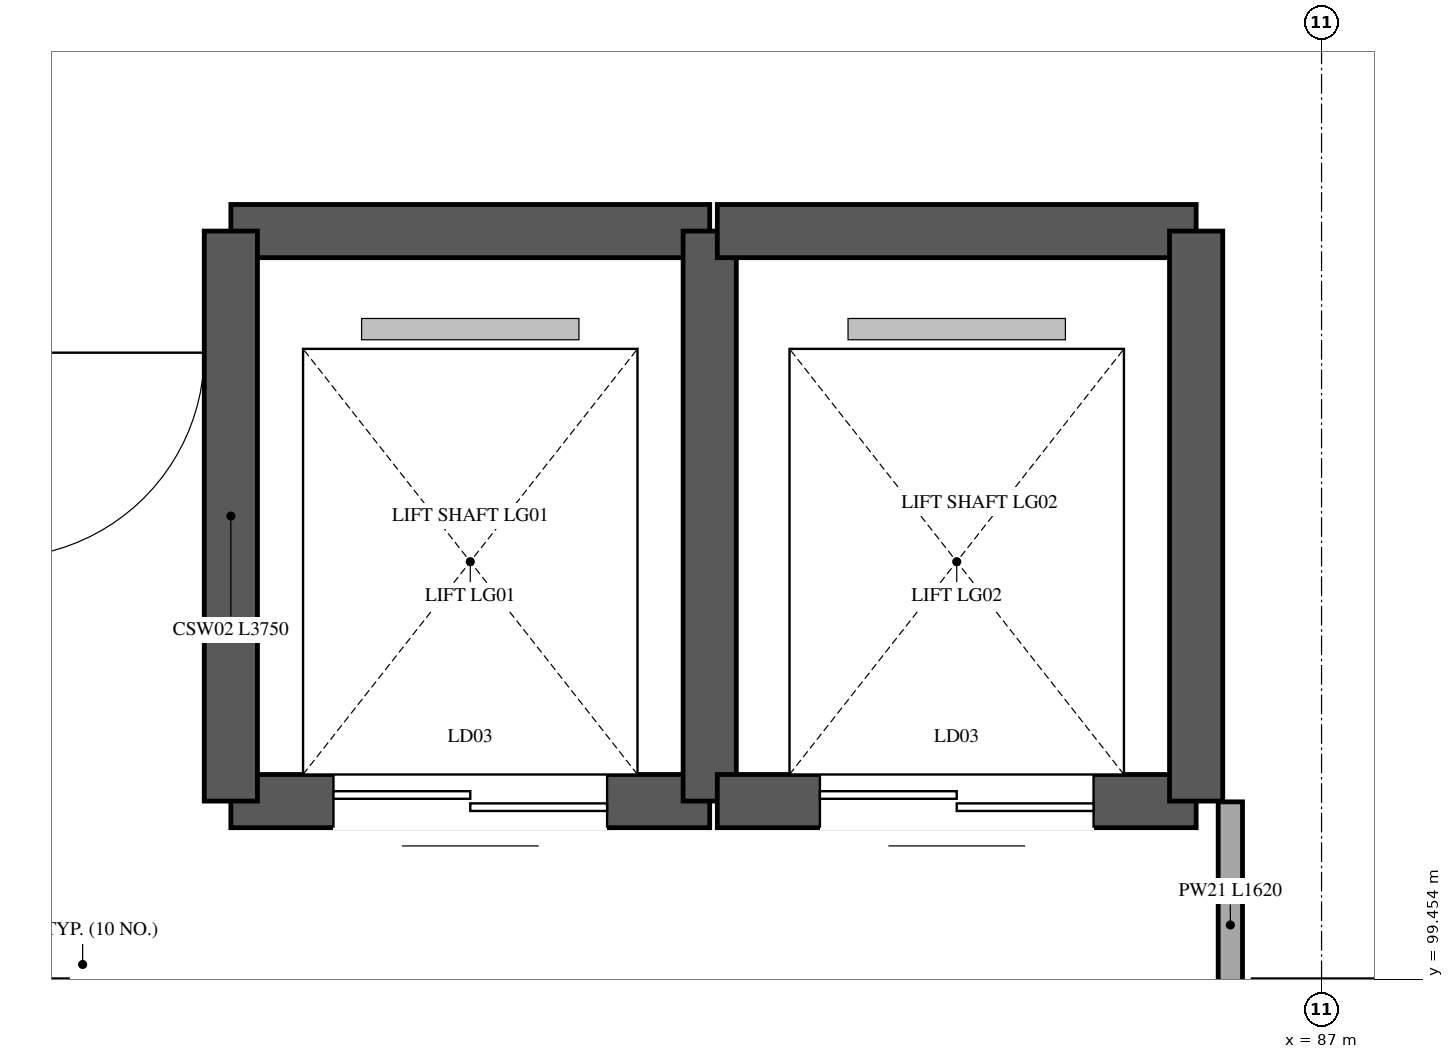
"""IFC4 building model, lengths in metres.
Left out: names, types, materials, properties, quantities, classifications, styles, units other than length and angle.
Written with IfcOpenShell. Run it as: python <this file> out.ifc"""

import sys

from ifc_helpers import new_model, si_unit, direction, frame, frame_2d, origin, place, context, subcontext, project, spatial, rectangle, extrude, element, fill, save


model = new_model("IFC4")
c1 = context("Model", 3, precision=1e-05, world=origin(), true_north=direction((0.0, 1.0)))
c2 = subcontext(c1, "Body", "Model", "MODEL_VIEW")
j1 = project(units=[si_unit("LENGTHUNIT", "METRE"), si_unit("PLANEANGLEUNIT", "RADIAN")], contexts=[c1])
p1 = place(None, origin())
s1 = spatial("IfcSite", under=j1, at=p1, CompositionType="ELEMENT")
p2 = place(p1, origin())
s2 = spatial("IfcBuilding", under=s1, at=p2, CompositionType="ELEMENT")
p3 = place(p2, origin())
s3 = spatial("IfcBuildingStorey", under=s2, at=p3, CompositionType="ELEMENT", Elevation=0.0)
p4 = place(p3, frame((79.825, 104.375, 0.0), z_axis=(0.0, 0.0, 1.0), x_axis=(1.0, 0.0, 0.0)))
e1 = element("IfcWall", 1, at=p4, inside=s3, PredefinedType="SHEAR", context=c2, shape_type="SweptSolid", body=[
    extrude(rectangle(XDim=3.15, YDim=0.35, at=frame_2d((1.575, 0.0))), origin(), (0.0, 0.0, 1.0), 6.0),
])
p5 = place(p3, frame((82.975, 100.625, 0.0), z_axis=(0.0, 0.0, 1.0), x_axis=(-1.0, 0.0, 0.0)))
e2 = element("IfcWall", 2, at=p5, inside=s3, PredefinedType="SHEAR", context=c2, shape_type="SweptSolid", body=[
    extrude(rectangle(XDim=3.15, YDim=0.35, at=frame_2d((1.575, 0.0))), origin(), (0.0, 0.0, 1.0), 6.0),
])
p6 = place(p5, frame((0.675, 0.0, 0.0)))
e3 = element("IfcOpeningElement", 3, at=p6, cuts=e2, PredefinedType="OPENING", context=c2, shape_type="SweptSolid", body=[
    extrude(rectangle(XDim=1.8, YDim=2.4, at=frame_2d((0.9, 1.2))), frame((0.0, 0.185, 0.0), z_axis=(0.0, -1.0, 0.0), x_axis=(1.0, 0.0, 0.0)), (0.0, 0.0, 1.0), 0.37),
])
for number, where, z_axis, x_axis in (
    (4, (79.825, 100.625, 0.0), (0.0, 0.0, 1.0), (0.0, 1.0, 0.0)),
    (5, (82.975, 104.375, 0.0), (0.0, 0.0, 1.0), (0.0, -1.0, 0.0)),
):
    element("IfcWall", number, at=place(p3, frame(where, z_axis=z_axis, x_axis=x_axis)), inside=s3, PredefinedType="SHEAR", context=c2, shape_type="SweptSolid", body=[
        extrude(rectangle(XDim=3.75, YDim=0.35, at=frame_2d((1.875, 0.0))), origin(), (0.0, 0.0, 1.0), 6.0),
    ])
p7 = place(p3, frame((83.025, 104.375, 0.0), z_axis=(0.0, 0.0, 1.0), x_axis=(1.0, 0.0, 0.0)))
e6 = element("IfcWall", 6, at=p7, inside=s3, PredefinedType="SHEAR", context=c2, shape_type="SweptSolid", body=[
    extrude(rectangle(XDim=3.15, YDim=0.35, at=frame_2d((1.575, 0.0))), origin(), (0.0, 0.0, 1.0), 6.0),
])
p8 = place(p3, frame((86.175, 100.625, 0.0), z_axis=(0.0, 0.0, 1.0), x_axis=(-1.0, 0.0, 0.0)))
e7 = element("IfcWall", 7, at=p8, inside=s3, PredefinedType="SHEAR", context=c2, shape_type="SweptSolid", body=[
    extrude(rectangle(XDim=3.15, YDim=0.35, at=frame_2d((1.575, 0.0))), origin(), (0.0, 0.0, 1.0), 6.0),
])
p9 = place(p8, frame((0.675, 0.0, 0.0)))
e8 = element("IfcOpeningElement", 8, at=p9, cuts=e7, PredefinedType="OPENING", context=c2, shape_type="SweptSolid", body=[
    extrude(rectangle(XDim=1.8, YDim=2.4, at=frame_2d((0.9, 1.2))), frame((0.0, 0.185, 0.0), z_axis=(0.0, -1.0, 0.0), x_axis=(1.0, 0.0, 0.0)), (0.0, 0.0, 1.0), 0.37),
])
p10 = place(p3, frame((86.175, 104.375, 0.0), z_axis=(0.0, 0.0, 1.0), x_axis=(0.0, -1.0, 0.0)))
e9 = element("IfcWall", 9, at=p10, inside=s3, PredefinedType="SHEAR", context=c2, shape_type="SweptSolid", body=[
    extrude(rectangle(XDim=3.75, YDim=0.35, at=frame_2d((1.875, 0.0))), origin(), (0.0, 0.0, 1.0), 6.0),
])
p11 = place(p3, frame((86.4, 100.62, 0.0), z_axis=(0.0, 0.0, 1.0), x_axis=(0.0, -1.0, 0.0)))
e10 = element("IfcWall", 10, at=p11, inside=s3, PredefinedType="PARTITIONING", context=c2, shape_type="SweptSolid", body=[
    extrude(rectangle(XDim=1.62, YDim=0.16, at=frame_2d((0.81, 0.0))), origin(), (0.0, 0.0, 1.0), 4.88),
])
p12 = place(p6, origin())
e11 = element("IfcDoor", 11, at=p12, inside=s3, OperationType="DOUBLE_DOOR_SLIDING", PredefinedType="DOOR", context=c2, shape_type="SweptSolid", body=[
    extrude(rectangle(XDim=1.8, YDim=2.4, at=frame_2d((0.9, 1.2))), frame((0.0, 0.025, 0.0), z_axis=(0.0, -1.0, 0.0), x_axis=(1.0, 0.0, 0.0)), (0.0, 0.0, 1.0), 0.05),
])
fill(e3, e11)
p13 = place(p9, origin())
e12 = element("IfcDoor", 12, at=p13, inside=s3, OperationType="DOUBLE_DOOR_SLIDING", PredefinedType="DOOR", context=c2, shape_type="SweptSolid", body=[
    extrude(rectangle(XDim=1.8, YDim=2.4, at=frame_2d((0.9, 1.2))), frame((0.0, 0.025, 0.0), z_axis=(0.0, -1.0, 0.0), x_axis=(1.0, 0.0, 0.0)), (0.0, 0.0, 1.0), 0.05),
])
fill(e8, e12)
save(model, sys.argv[1])
